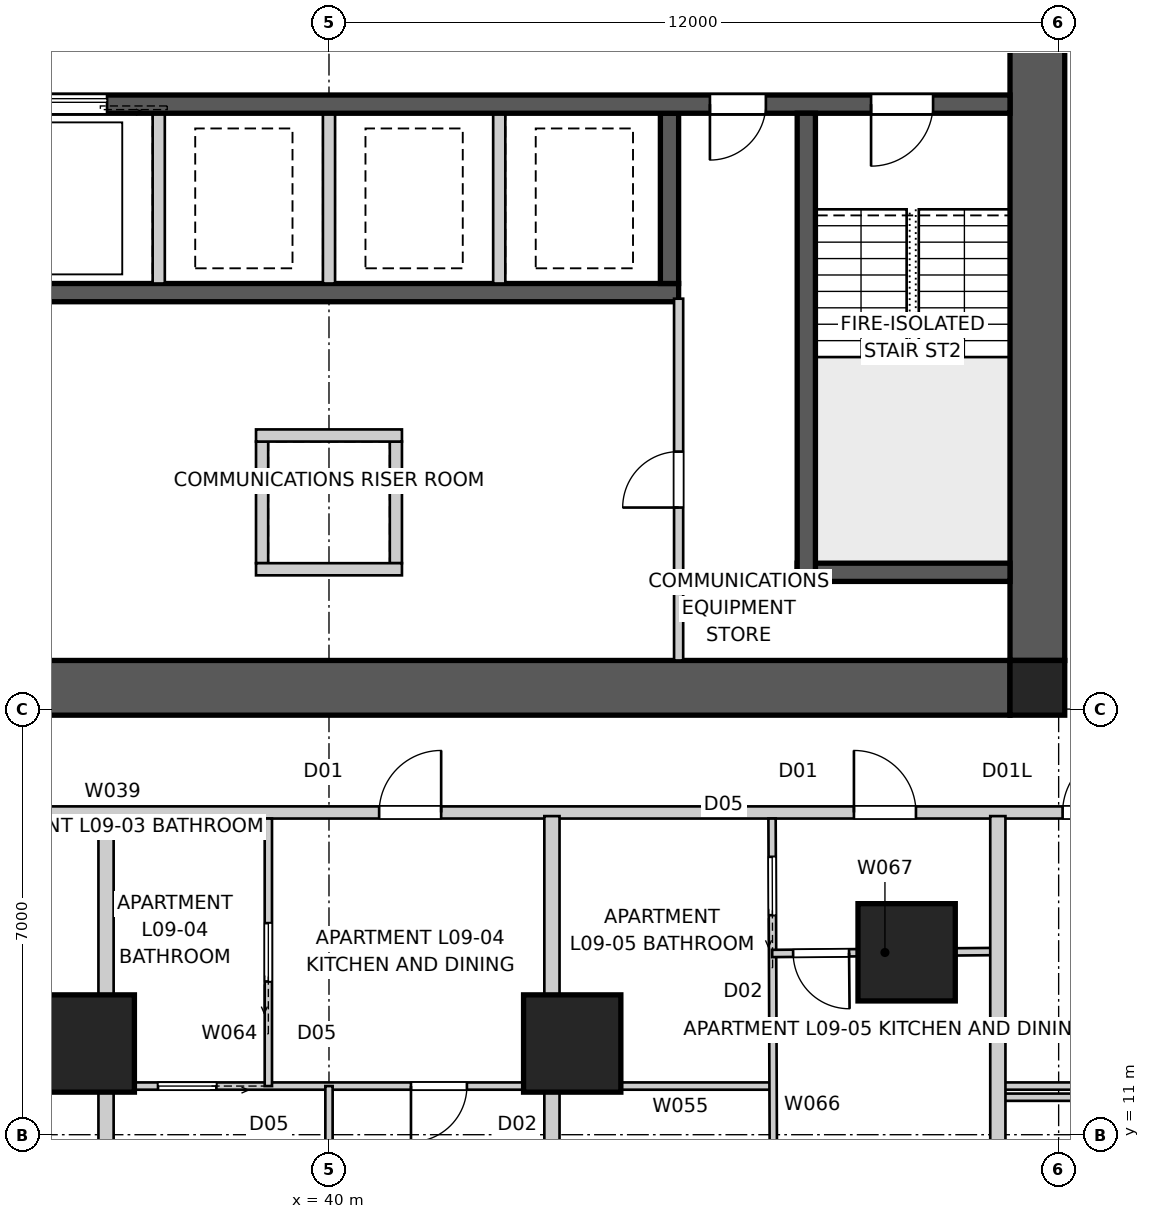
"""IFC4 building model, lengths in metres.
Left out: names, types, materials, properties, quantities, classifications, styles, units other than length and angle.
Written with IfcOpenShell. Run it as: python <this file> out.ifc"""

import sys

from ifc_helpers import new_model, si_unit, direction, frame, frame_2d, origin, origin_2d, place, context, subcontext, project, spatial, polyline, rectangle, outline, extrude, element, fill, save


model = new_model("IFC4")
c1 = context("Model", 3, precision=1e-05, world=origin(), true_north=direction((0.0, 1.0)))
c2 = subcontext(c1, "Body", "Model", "MODEL_VIEW")
j1 = project(units=[si_unit("LENGTHUNIT", "METRE"), si_unit("PLANEANGLEUNIT", "RADIAN")], contexts=[c1])
p1 = place(None, origin())
s1 = spatial("IfcSite", under=j1, at=p1, CompositionType="ELEMENT")
p2 = place(p1, origin())
s2 = spatial("IfcBuilding", under=s1, at=p2, CompositionType="ELEMENT")
p3 = place(p2, frame((0.0, 0.0, 35.4)))
s3 = spatial("IfcBuildingStorey", under=s2, at=p3, CompositionType="ELEMENT", Elevation=35.4)
p4 = place(p3, frame((51.2, 18.35, 0.0), z_axis=(0.0, 0.0, 1.0), x_axis=(-1.0, 0.0, 0.0)))
e1 = element("IfcWall", 1, at=p4, inside=s3, PredefinedType="SHEAR", context=c2, shape_type="SweptSolid", body=[
    extrude(outline(polyline([(0.0, -0.45), (22.4, -0.45), (22.4, -0.025), (22.85, -0.025), (22.85, 0.025), (22.4, 0.025), (22.4, 0.45), (0.0, 0.45), (0.0, 0.025), (-0.45, 0.025), (-0.45, -0.025), (0.0, -0.025), (0.0, -0.45)])), origin(), (0.0, 0.0, 1.0), 3.4),
])
p5 = place(p3, frame((51.65, 18.8, 0.0), z_axis=(0.0, 0.0, 1.0), x_axis=(0.0, 1.0, 0.0)))
e2 = element("IfcWall", 2, at=p5, inside=s3, PredefinedType="SHEAR", context=c2, shape_type="SweptSolid", body=[
    extrude(outline(polyline([(0.0, -0.45), (22.4, -0.45), (22.4, -0.025), (22.85, -0.025), (22.85, 0.025), (22.4, 0.025), (22.4, 0.45), (0.0, 0.45), (0.0, 0.025), (-0.45, 0.025), (-0.45, -0.025), (0.0, -0.025), (0.0, -0.45)])), origin(), (0.0, 0.0, 1.0), 3.4),
])
p6 = place(p5, frame((11.14, 0.0, 0.0)))
e3 = element("IfcOpeningElement", 3, at=p6, cuts=e2, PredefinedType="OPENING", context=c2, shape_type="SweptSolid", body=[
    extrude(rectangle(XDim=1.02, YDim=2.4, at=frame_2d((0.51, 1.2))), frame((0.0, 0.46, 0.0), z_axis=(0.0, -1.0, 0.0), x_axis=(1.0, 0.0, 0.0)), (0.0, 0.0, 1.0), 0.92),
])
p7 = place(p3, frame((51.2, 27.95, 0.0), z_axis=(0.0, 0.0, 1.0), x_axis=(-1.0, 0.0, 0.0)))
e4 = element("IfcWall", 4, at=p7, inside=s3, PredefinedType="SHEAR", context=c2, shape_type="SweptSolid", body=[
    extrude(rectangle(XDim=22.4, YDim=0.3, at=frame_2d((11.2, 0.0))), origin(), (0.0, 0.0, 1.0), 3.4),
])
p8 = place(p7, frame((19.04, 0.0, 0.0)))
e5 = element("IfcOpeningElement", 5, at=p8, cuts=e4, PredefinedType="OPENING", context=c2, shape_type="SweptSolid", body=[
    extrude(rectangle(XDim=0.92, YDim=2.1, at=frame_2d((0.46, 1.05))), frame((0.0, 0.16, 0.0), z_axis=(0.0, -1.0, 0.0), x_axis=(1.0, 0.0, 0.0)), (0.0, 0.0, 1.0), 0.32),
])
p9 = place(p7, frame((1.265, 0.0, 0.0)))
e6 = element("IfcOpeningElement", 6, at=p9, cuts=e4, PredefinedType="OPENING", context=c2, shape_type="SweptSolid", body=[
    extrude(rectangle(XDim=1.02, YDim=2.1, at=frame_2d((0.51, 1.05))), frame((0.0, 0.16, 0.0), z_axis=(0.0, -1.0, 0.0), x_axis=(1.0, 0.0, 0.0)), (0.0, 0.0, 1.0), 0.32),
])
p10 = place(p7, frame((4.015, 0.0, 0.0)))
e7 = element("IfcOpeningElement", 7, at=p10, cuts=e4, PredefinedType="OPENING", context=c2, shape_type="SweptSolid", body=[
    extrude(rectangle(XDim=0.92, YDim=2.1, at=frame_2d((0.46, 1.05))), frame((0.0, 0.16, 0.0), z_axis=(0.0, -1.0, 0.0), x_axis=(1.0, 0.0, 0.0)), (0.0, 0.0, 1.0), 0.32),
])
p11 = place(p7, frame((14.85, 0.0, 0.0)))
e8 = element("IfcOpeningElement", 8, at=p11, cuts=e4, PredefinedType="OPENING", context=c2, shape_type="SweptSolid", body=[
    extrude(rectangle(XDim=1.1, YDim=2.1, at=frame_2d((0.55, 1.05))), frame((0.0, 0.16, 0.0), z_axis=(0.0, -1.0, 0.0), x_axis=(1.0, 0.0, 0.0)), (0.0, 0.0, 1.0), 0.32),
])
p12 = place(p3, frame((45.75, 24.85, 0.0), z_axis=(0.0, 0.0, 1.0), x_axis=(-1.0, 0.0, 0.0)))
e9 = element("IfcWall", 9, at=p12, inside=s3, PredefinedType="SHEAR", context=c2, shape_type="SweptSolid", body=[
    extrude(rectangle(XDim=11.5, YDim=0.3, at=frame_2d((5.75, 0.0))), origin(), (0.0, 0.0, 1.0), 3.4),
])
p13 = place(p3, frame((45.6, 27.8, 0.0), z_axis=(0.0, 0.0, 1.0), x_axis=(0.0, -1.0, 0.0)))
e10 = element("IfcWall", 10, at=p13, inside=s3, PredefinedType="SHEAR", context=c2, shape_type="SweptSolid", body=[
    extrude(rectangle(XDim=2.8, YDim=0.3, at=frame_2d((1.4, 0.0))), origin(), (0.0, 0.0, 1.0), 3.4),
])
for number, where, z_axis, x_axis in (
    (11, (42.8, 27.8, 0.0), (0.0, 0.0, 1.0), (0.0, -1.0, 0.0)),
    (12, (40.0, 27.8, 0.0), (0.0, 0.0, 1.0), (0.0, -1.0, 0.0)),
    (13, (37.2, 27.8, 0.0), (0.0, 0.0, 1.0), (0.0, -1.0, 0.0)),
):
    element("IfcWall", number, at=place(p3, frame(where, z_axis=z_axis, x_axis=x_axis)), inside=s3, PredefinedType="SOLIDWALL", context=c2, shape_type="SweptSolid", body=[
        extrude(rectangle(XDim=2.8, YDim=0.2, at=frame_2d((1.4, 0.0))), origin(), (0.0, 0.0, 1.0), 3.4),
    ])
p14 = place(p3, frame((47.85, 27.8, 0.0), z_axis=(0.0, 0.0, 1.0), x_axis=(0.0, -1.0, 0.0)))
e14 = element("IfcWall", 14, at=p14, inside=s3, PredefinedType="SHEAR", context=c2, shape_type="SweptSolid", body=[
    extrude(rectangle(XDim=7.7, YDim=0.3, at=frame_2d((3.85, 0.0))), origin(), (0.0, 0.0, 1.0), 3.4),
])
p15 = place(p3, frame((51.2, 20.25, 0.0), z_axis=(0.0, 0.0, 1.0), x_axis=(-1.0, 0.0, 0.0)))
e15 = element("IfcWall", 15, at=p15, inside=s3, PredefinedType="SHEAR", context=c2, shape_type="SweptSolid", body=[
    extrude(rectangle(XDim=3.5, YDim=0.3, at=frame_2d((1.75, 0.0))), origin(), (0.0, 0.0, 1.0), 3.4),
])
for number, where, z_axis, x_axis in (
    (16, (38.9, 22.4, 0.0), (0.0, 0.0, 1.0), (0.0, -1.0, 0.0)),
    (17, (41.1, 22.4, 0.0), (0.0, 0.0, 1.0), (0.0, -1.0, 0.0)),
):
    element("IfcWall", number, at=place(p3, frame(where, z_axis=z_axis, x_axis=x_axis)), inside=s3, PredefinedType="SOLIDWALL", context=c2, shape_type="SweptSolid", body=[
        extrude(rectangle(XDim=2.0, YDim=0.2, at=frame_2d((1.0, 0.0))), origin(), (0.0, 0.0, 1.0), 3.4),
    ])
for number, where, z_axis, x_axis in (
    (18, (38.8, 22.5, 0.0), (0.0, 0.0, 1.0), (1.0, 0.0, 0.0)),
    (19, (38.8, 20.3, 0.0), (0.0, 0.0, 1.0), (1.0, 0.0, 0.0)),
):
    element("IfcWall", number, at=place(p3, frame(where, z_axis=z_axis, x_axis=x_axis)), inside=s3, PredefinedType="SOLIDWALL", context=c2, shape_type="SweptSolid", body=[
        extrude(rectangle(XDim=2.4, YDim=0.2, at=frame_2d((1.2, 0.0))), origin(), (0.0, 0.0, 1.0), 3.4),
    ])
p16 = place(p3, frame((51.65, 18.35, 0.0), z_axis=(0.0, 0.0, 1.0), x_axis=(1.0, 0.0, 0.0)))
e20 = element("IfcColumn", 20, at=p16, inside=s3, PredefinedType="COLUMN", context=c2, shape_type="SweptSolid", body=[
    extrude(rectangle(XDim=0.9, YDim=0.9, at=origin_2d()), origin(), (0.0, 0.0, 1.0), 3.4),
])
for number, where, z_axis, x_axis in (
    (21, (36.0, 12.5, 0.0), (0.0, 0.0, 1.0), (1.0, 0.0, 0.0)),
    (22, (44.0, 12.5, 0.0), (0.0, 0.0, 1.0), (1.0, 0.0, 0.0)),
    (23, (49.5, 14.0, 0.0), (0.0, 0.0, 1.0), (1.0, 0.0, 0.0)),
):
    element("IfcColumn", number, at=place(p3, frame(where, z_axis=z_axis, x_axis=x_axis)), inside=s3, PredefinedType="COLUMN", context=c2, shape_type="SweptSolid", body=[
        extrude(rectangle(XDim=1.6, YDim=1.6, at=origin_2d()), origin(), (0.0, 0.0, 1.0), 3.4),
    ])
p17 = place(p3, frame((26.3, 16.3, 0.0), z_axis=(0.0, 0.0, 1.0), x_axis=(1.0, 0.0, 0.0)))
e24 = element("IfcWall", 24, at=p17, inside=s3, PredefinedType="PARTITIONING", context=c2, shape_type="SweptSolid", body=[
    extrude(rectangle(XDim=28.2, YDim=0.2, at=frame_2d((14.1, 0.0))), origin(), (0.0, 0.0, 1.0), 3.25),
])
p18 = place(p17, frame((4.738, 0.0, 0.0)))
e25 = element("IfcOpeningElement", 25, at=p18, cuts=e24, PredefinedType="OPENING", context=c2, shape_type="SweptSolid", body=[
    extrude(rectangle(XDim=1.02, YDim=2.34, at=frame_2d((0.51, 1.17))), frame((0.0, 0.11, 0.0), z_axis=(0.0, -1.0, 0.0), x_axis=(1.0, 0.0, 0.0)), (0.0, 0.0, 1.0), 0.22),
])
p19 = place(p17, frame((14.525, 0.0, 0.0)))
e26 = element("IfcOpeningElement", 26, at=p19, cuts=e24, PredefinedType="OPENING", context=c2, shape_type="SweptSolid", body=[
    extrude(rectangle(XDim=1.02, YDim=2.34, at=frame_2d((0.51, 1.17))), frame((0.0, 0.11, 0.0), z_axis=(0.0, -1.0, 0.0), x_axis=(1.0, 0.0, 0.0)), (0.0, 0.0, 1.0), 0.22),
])
p20 = place(p17, frame((22.333, 0.0, 0.0)))
e27 = element("IfcOpeningElement", 27, at=p20, cuts=e24, PredefinedType="OPENING", context=c2, shape_type="SweptSolid", body=[
    extrude(rectangle(XDim=1.02, YDim=2.34, at=frame_2d((0.51, 1.17))), frame((0.0, 0.11, 0.0), z_axis=(0.0, -1.0, 0.0), x_axis=(1.0, 0.0, 0.0)), (0.0, 0.0, 1.0), 0.22),
])
p21 = place(p17, frame((25.765, 0.0, 0.0)))
e28 = element("IfcOpeningElement", 28, at=p21, cuts=e24, PredefinedType="OPENING", context=c2, shape_type="SweptSolid", body=[
    extrude(rectangle(XDim=1.02, YDim=2.1, at=frame_2d((0.51, 1.05))), frame((0.0, 0.11, 0.0), z_axis=(0.0, -1.0, 0.0), x_axis=(1.0, 0.0, 0.0)), (0.0, 0.0, 1.0), 0.22),
])
p22 = place(p17, frame((1.015, 0.0, 0.0)))
e29 = element("IfcOpeningElement", 29, at=p22, cuts=e24, PredefinedType="OPENING", context=c2, shape_type="SweptSolid", body=[
    extrude(rectangle(XDim=1.02, YDim=2.1, at=frame_2d((0.51, 1.05))), frame((0.0, 0.11, 0.0), z_axis=(0.0, -1.0, 0.0), x_axis=(1.0, 0.0, 0.0)), (0.0, 0.0, 1.0), 0.22),
])
for number, where, z_axis, x_axis in (
    (30, (36.333, 4.0, 0.0), (0.0, 0.0, 1.0), (0.0, 1.0, 0.0)),
    (31, (43.667, 4.0, 0.0), (0.0, 0.0, 1.0), (0.0, 1.0, 0.0)),
    (32, (51.0, 4.0, 0.0), (0.0, 0.0, 1.0), (0.0, 1.0, 0.0)),
):
    element("IfcWall", number, at=place(p3, frame(where, z_axis=z_axis, x_axis=x_axis)), inside=s3, PredefinedType="PARTITIONING", context=c2, shape_type="SweptSolid", body=[
        extrude(rectangle(XDim=12.24, YDim=0.25, at=frame_2d((6.12, 0.0))), origin(), (0.0, 0.0, 1.0), 3.25),
    ])
p23 = place(p3, frame((45.75, 18.8, 0.0), z_axis=(0.0, 0.0, 1.0), x_axis=(0.0, 1.0, 0.0)))
e33 = element("IfcWall", 33, at=p23, inside=s3, PredefinedType="SOLIDWALL", context=c2, shape_type="SweptSolid", body=[
    extrude(rectangle(XDim=5.95, YDim=0.15, at=frame_2d((2.975, 0.0))), origin(), (0.0, 0.0, 1.0), 3.25),
])
p24 = place(p23, frame((2.515, 0.0, 0.0)))
e34 = element("IfcOpeningElement", 34, at=p24, cuts=e33, PredefinedType="OPENING", context=c2, shape_type="SweptSolid", body=[
    extrude(rectangle(XDim=0.92, YDim=2.1, at=frame_2d((0.46, 1.05))), frame((0.0, 0.085, 0.0), z_axis=(0.0, -1.0, 0.0), x_axis=(1.0, 0.0, 0.0)), (0.0, 0.0, 1.0), 0.17),
])
p25 = place(p3, frame((47.287, 11.8, 0.0), z_axis=(0.0, 0.0, 1.0), x_axis=(-1.0, 0.0, 0.0)))
e35 = element("IfcWall", 35, at=p25, inside=s3, PredefinedType="PARTITIONING", context=c2, shape_type="SweptSolid", body=[
    extrude(rectangle(XDim=22.003, YDim=0.12, at=frame_2d((11.002, 0.0))), origin(), (0.0, 0.0, 1.0), 3.25),
])
p26 = place(p25, frame((15.968, 0.0, 0.0)))
e36 = element("IfcOpeningElement", 36, at=p26, cuts=e35, PredefinedType="OPENING", context=c2, shape_type="SweptSolid", body=[
    extrude(rectangle(XDim=0.92, YDim=2.34, at=frame_2d((0.46, 1.17))), frame((0.0, 0.07, 0.0), z_axis=(0.0, -1.0, 0.0), x_axis=(1.0, 0.0, 0.0)), (0.0, 0.0, 1.0), 0.14),
])
p27 = place(p25, frame((13.47, 0.0, 0.0)))
e37 = element("IfcOpeningElement", 37, at=p27, cuts=e35, PredefinedType="OPENING", context=c2, shape_type="SweptSolid", body=[
    extrude(rectangle(XDim=0.92, YDim=2.34, at=frame_2d((0.46, 1.17))), frame((0.0, 0.07, 0.0), z_axis=(0.0, -1.0, 0.0), x_axis=(1.0, 0.0, 0.0)), (0.0, 0.0, 1.0), 0.14),
])
p28 = place(p25, frame((5.018, 0.0, 0.0)))
e38 = element("IfcOpeningElement", 38, at=p28, cuts=e35, PredefinedType="OPENING", context=c2, shape_type="SweptSolid", body=[
    extrude(rectangle(XDim=0.92, YDim=2.34, at=frame_2d((0.46, 1.17))), frame((0.0, 0.07, 0.0), z_axis=(0.0, -1.0, 0.0), x_axis=(1.0, 0.0, 0.0)), (0.0, 0.0, 1.0), 0.14),
])
p29 = place(p25, frame((19.685, 0.0, 0.0)))
e39 = element("IfcOpeningElement", 39, at=p29, cuts=e35, PredefinedType="OPENING", context=c2, shape_type="SweptSolid", body=[
    extrude(rectangle(XDim=0.92, YDim=2.34, at=frame_2d((0.46, 1.17))), frame((0.0, 0.07, 0.0), z_axis=(0.0, -1.0, 0.0), x_axis=(1.0, 0.0, 0.0)), (0.0, 0.0, 1.0), 0.14),
])
p30 = place(p25, frame((9.138, 0.0, 0.0)))
e40 = element("IfcOpeningElement", 40, at=p30, cuts=e35, PredefinedType="OPENING", context=c2, shape_type="SweptSolid", body=[
    extrude(rectangle(XDim=0.96, YDim=2.1, at=frame_2d((0.48, 1.05))), frame((0.0, 0.07, 0.0), z_axis=(0.0, -1.0, 0.0), x_axis=(1.0, 0.0, 0.0)), (0.0, 0.0, 1.0), 0.14),
])
p31 = place(p3, frame((39.003, 11.8, 0.0), z_axis=(0.0, 0.0, 1.0), x_axis=(0.0, 1.0, 0.0)))
e41 = element("IfcWall", 41, at=p31, inside=s3, PredefinedType="PARTITIONING", context=c2, shape_type="SweptSolid", body=[
    extrude(rectangle(XDim=4.4, YDim=0.12, at=frame_2d((2.2, 0.0))), origin(), (0.0, 0.0, 1.0), 3.25),
])
p32 = place(p31, frame((1.72, 0.0, 0.0)))
e42 = element("IfcOpeningElement", 42, at=p32, cuts=e41, PredefinedType="OPENING", context=c2, shape_type="SweptSolid", body=[
    extrude(rectangle(XDim=0.96, YDim=2.1, at=frame_2d((0.48, 1.05))), frame((0.0, 0.07, 0.0), z_axis=(0.0, -1.0, 0.0), x_axis=(1.0, 0.0, 0.0)), (0.0, 0.0, 1.0), 0.14),
])
p33 = place(p3, frame((40.0, 11.8, 0.0), z_axis=(0.0, 0.0, 1.0), x_axis=(0.0, -1.0, 0.0)))
e43 = element("IfcWall", 43, at=p33, inside=s3, PredefinedType="PARTITIONING", context=c2, shape_type="SweptSolid", body=[
    extrude(rectangle(XDim=7.76, YDim=0.12, at=frame_2d((3.88, 0.0))), origin(), (0.0, 0.0, 1.0), 3.25),
])
p34 = place(p3, frame((47.333, 4.04, 0.0), z_axis=(0.0, 0.0, 1.0), x_axis=(-0.003834774141, 0.999992647227, 0.0)))
e44 = element("IfcWall", 44, at=p34, inside=s3, PredefinedType="PARTITIONING", context=c2, shape_type="SweptSolid", body=[
    extrude(rectangle(XDim=12.16, YDim=0.12, at=frame_2d((6.08, 0.0))), origin(), (0.0, 0.0, 1.0), 3.25),
])
p35 = place(p34, frame((10.57, 0.0, 0.0)))
e45 = element("IfcOpeningElement", 45, at=p35, cuts=e44, PredefinedType="OPENING", context=c2, shape_type="SweptSolid", body=[
    extrude(rectangle(XDim=0.96, YDim=2.1, at=frame_2d((0.48, 1.05))), frame((0.0, 0.07, 0.0), z_axis=(0.0, -1.0, 0.0), x_axis=(1.0, 0.0, 0.0)), (0.0, 0.0, 1.0), 0.14),
])
p36 = place(p34, frame((3.4, 0.0, 0.0)))
e46 = element("IfcOpeningElement", 46, at=p36, cuts=e44, PredefinedType="OPENING", context=c2, shape_type="SweptSolid", body=[
    extrude(rectangle(XDim=0.92, YDim=2.34, at=frame_2d((0.46, 1.17))), frame((0.0, 0.07, 0.0), z_axis=(0.0, -1.0, 0.0), x_axis=(1.0, 0.0, 0.0)), (0.0, 0.0, 1.0), 0.14),
])
p37 = place(p3, frame((51.0, 14.013, 0.0), z_axis=(0.0, 0.0, 1.0), x_axis=(-0.999961771263, -0.008743912924, 0.0)))
e47 = element("IfcWall", 47, at=p37, inside=s3, PredefinedType="PARTITIONING", context=c2, shape_type="SweptSolid", body=[
    extrude(rectangle(XDim=3.714, YDim=0.12, at=frame_2d((1.857, 0.0))), origin(), (0.0, 0.0, 1.0), 2.549),
])
p38 = place(p37, frame((2.447, 0.0, 0.0)))
e48 = element("IfcOpeningElement", 48, at=p38, cuts=e47, PredefinedType="OPENING", context=c2, shape_type="SweptSolid", body=[
    extrude(rectangle(XDim=0.92, YDim=2.34, at=frame_2d((0.46, 1.17))), frame((0.0, 0.07, 0.0), z_axis=(0.0, -1.0, 0.0), x_axis=(1.0, 0.0, 0.0)), (0.0, 0.0, 1.0), 0.14),
])
p39 = place(p3, frame((58.2, 11.8, 0.0), z_axis=(0.0, 0.0, 1.0), x_axis=(-1.0, 0.0, 0.0)))
e49 = element("IfcWall", 49, at=p39, inside=s3, PredefinedType="PARTITIONING", context=c2, shape_type="SweptSolid", body=[
    extrude(rectangle(XDim=7.2, YDim=0.12, at=frame_2d((3.6, 0.0))), origin(), (0.0, 0.0, 1.0), 3.25),
])
p40 = place(p3, frame((58.333, 11.617, 0.0), z_axis=(0.0, 0.0, 1.0), x_axis=(-1.0, 0.0, 0.0)))
e50 = element("IfcWall", 50, at=p40, inside=s3, PredefinedType="PARTITIONING", context=c2, shape_type="SweptSolid", body=[
    extrude(rectangle(XDim=7.333, YDim=0.12, at=frame_2d((3.667, 0.0))), origin(), (0.0, 0.0, 1.0), 3.25),
])
p41 = place(p9, origin())
e51 = element("IfcDoor", 51, at=p41, inside=s3, OperationType="SINGLE_SWING_RIGHT", PredefinedType="DOOR", context=c2, shape_type="SweptSolid", body=[
    extrude(rectangle(XDim=1.02, YDim=2.1, at=frame_2d((0.51, 1.05))), frame((0.0, 0.025, 0.0), z_axis=(0.0, -1.0, 0.0), x_axis=(1.0, 0.0, 0.0)), (0.0, 0.0, 1.0), 0.05),
])
fill(e6, e51)
p42 = place(p10, origin())
e52 = element("IfcDoor", 52, at=p42, inside=s3, OperationType="SINGLE_SWING_RIGHT", PredefinedType="DOOR", context=c2, shape_type="SweptSolid", body=[
    extrude(rectangle(XDim=0.92, YDim=2.1, at=frame_2d((0.46, 1.05))), frame((0.0, 0.025, 0.0), z_axis=(0.0, -1.0, 0.0), x_axis=(1.0, 0.0, 0.0)), (0.0, 0.0, 1.0), 0.05),
])
fill(e7, e52)
p43 = place(p19, origin())
e53 = element("IfcDoor", 53, at=p43, inside=s3, OperationType="SINGLE_SWING_RIGHT", PredefinedType="DOOR", context=c2, shape_type="SweptSolid", body=[
    extrude(rectangle(XDim=1.02, YDim=2.34, at=frame_2d((0.51, 1.17))), frame((0.0, 0.025, 0.0), z_axis=(0.0, -1.0, 0.0), x_axis=(1.0, 0.0, 0.0)), (0.0, 0.0, 1.0), 0.05),
])
fill(e26, e53)
p44 = place(p20, origin())
e54 = element("IfcDoor", 54, at=p44, inside=s3, OperationType="SINGLE_SWING_LEFT", PredefinedType="DOOR", context=c2, shape_type="SweptSolid", body=[
    extrude(rectangle(XDim=1.02, YDim=2.34, at=frame_2d((0.51, 1.17))), frame((0.0, 0.025, 0.0), z_axis=(0.0, -1.0, 0.0), x_axis=(1.0, 0.0, 0.0)), (0.0, 0.0, 1.0), 0.05),
])
fill(e27, e54)
p45 = place(p21, origin())
e55 = element("IfcDoor", 55, at=p45, inside=s3, OperationType="SINGLE_SWING_RIGHT", PredefinedType="DOOR", context=c2, shape_type="SweptSolid", body=[
    extrude(rectangle(XDim=1.02, YDim=2.1, at=frame_2d((0.51, 1.05))), frame((0.0, 0.025, 0.0), z_axis=(0.0, -1.0, 0.0), x_axis=(1.0, 0.0, 0.0)), (0.0, 0.0, 1.0), 0.05),
])
fill(e28, e55)
p46 = place(p24, origin())
e56 = element("IfcDoor", 56, at=p46, inside=s3, OperationType="SINGLE_SWING_LEFT", PredefinedType="DOOR", context=c2, shape_type="SweptSolid", body=[
    extrude(rectangle(XDim=0.92, YDim=2.1, at=frame_2d((0.46, 1.05))), frame((0.0, 0.025, 0.0), z_axis=(0.0, -1.0, 0.0), x_axis=(1.0, 0.0, 0.0)), (0.0, 0.0, 1.0), 0.05),
])
fill(e34, e56)
p47 = place(p32, origin())
e57 = element("IfcDoor", 57, at=p47, inside=s3, OperationType="SLIDING_TO_LEFT", PredefinedType="DOOR", context=c2, shape_type="SweptSolid", body=[
    extrude(rectangle(XDim=0.96, YDim=2.1, at=frame_2d((0.48, 1.05))), frame((0.0, 0.025, 0.0), z_axis=(0.0, -1.0, 0.0), x_axis=(1.0, 0.0, 0.0)), (0.0, 0.0, 1.0), 0.05),
])
fill(e42, e57)
p48 = place(p28, origin())
e58 = element("IfcDoor", 58, at=p48, inside=s3, OperationType="SINGLE_SWING_RIGHT", PredefinedType="DOOR", context=c2, shape_type="SweptSolid", body=[
    extrude(rectangle(XDim=0.92, YDim=2.34, at=frame_2d((0.46, 1.17))), frame((0.0, 0.025, 0.0), z_axis=(0.0, -1.0, 0.0), x_axis=(1.0, 0.0, 0.0)), (0.0, 0.0, 1.0), 0.05),
])
fill(e38, e58)
p49 = place(p38, origin())
e59 = element("IfcDoor", 59, at=p49, inside=s3, OperationType="SINGLE_SWING_LEFT", PredefinedType="DOOR", context=c2, shape_type="SweptSolid", body=[
    extrude(rectangle(XDim=0.92, YDim=2.34, at=frame_2d((0.46, 1.17))), frame((0.0, 0.025, 0.0), z_axis=(0.0, -1.0, 0.0), x_axis=(1.0, 0.0, 0.0)), (0.0, 0.0, 1.0), 0.05),
])
fill(e48, e59)
p50 = place(p35, origin())
e60 = element("IfcDoor", 60, at=p50, inside=s3, OperationType="SLIDING_TO_LEFT", PredefinedType="DOOR", context=c2, shape_type="SweptSolid", body=[
    extrude(rectangle(XDim=0.96, YDim=2.1, at=frame_2d((0.48, 1.05))), frame((0.0, 0.025, 0.0), z_axis=(0.0, -1.0, 0.0), x_axis=(1.0, 0.0, 0.0)), (0.0, 0.0, 1.0), 0.05),
])
fill(e45, e60)
p51 = place(p30, origin())
e61 = element("IfcDoor", 61, at=p51, inside=s3, OperationType="SLIDING_TO_LEFT", PredefinedType="DOOR", context=c2, shape_type="SweptSolid", body=[
    extrude(rectangle(XDim=0.96, YDim=2.1, at=frame_2d((0.48, 1.05))), frame((0.0, 0.025, 0.0), z_axis=(0.0, -1.0, 0.0), x_axis=(1.0, 0.0, 0.0)), (0.0, 0.0, 1.0), 0.05),
])
fill(e40, e61)
p52 = place(p11, origin())
e62 = element("IfcDoor", 62, at=p52, inside=s3, OperationType="SLIDING_TO_LEFT", PredefinedType="DOOR", context=c2, shape_type="SweptSolid", body=[
    extrude(rectangle(XDim=1.1, YDim=2.1, at=frame_2d((0.55, 1.05))), frame((0.0, 0.025, 0.0), z_axis=(0.0, -1.0, 0.0), x_axis=(1.0, 0.0, 0.0)), (0.0, 0.0, 1.0), 0.05),
])
fill(e8, e62)
save(model, sys.argv[1])
